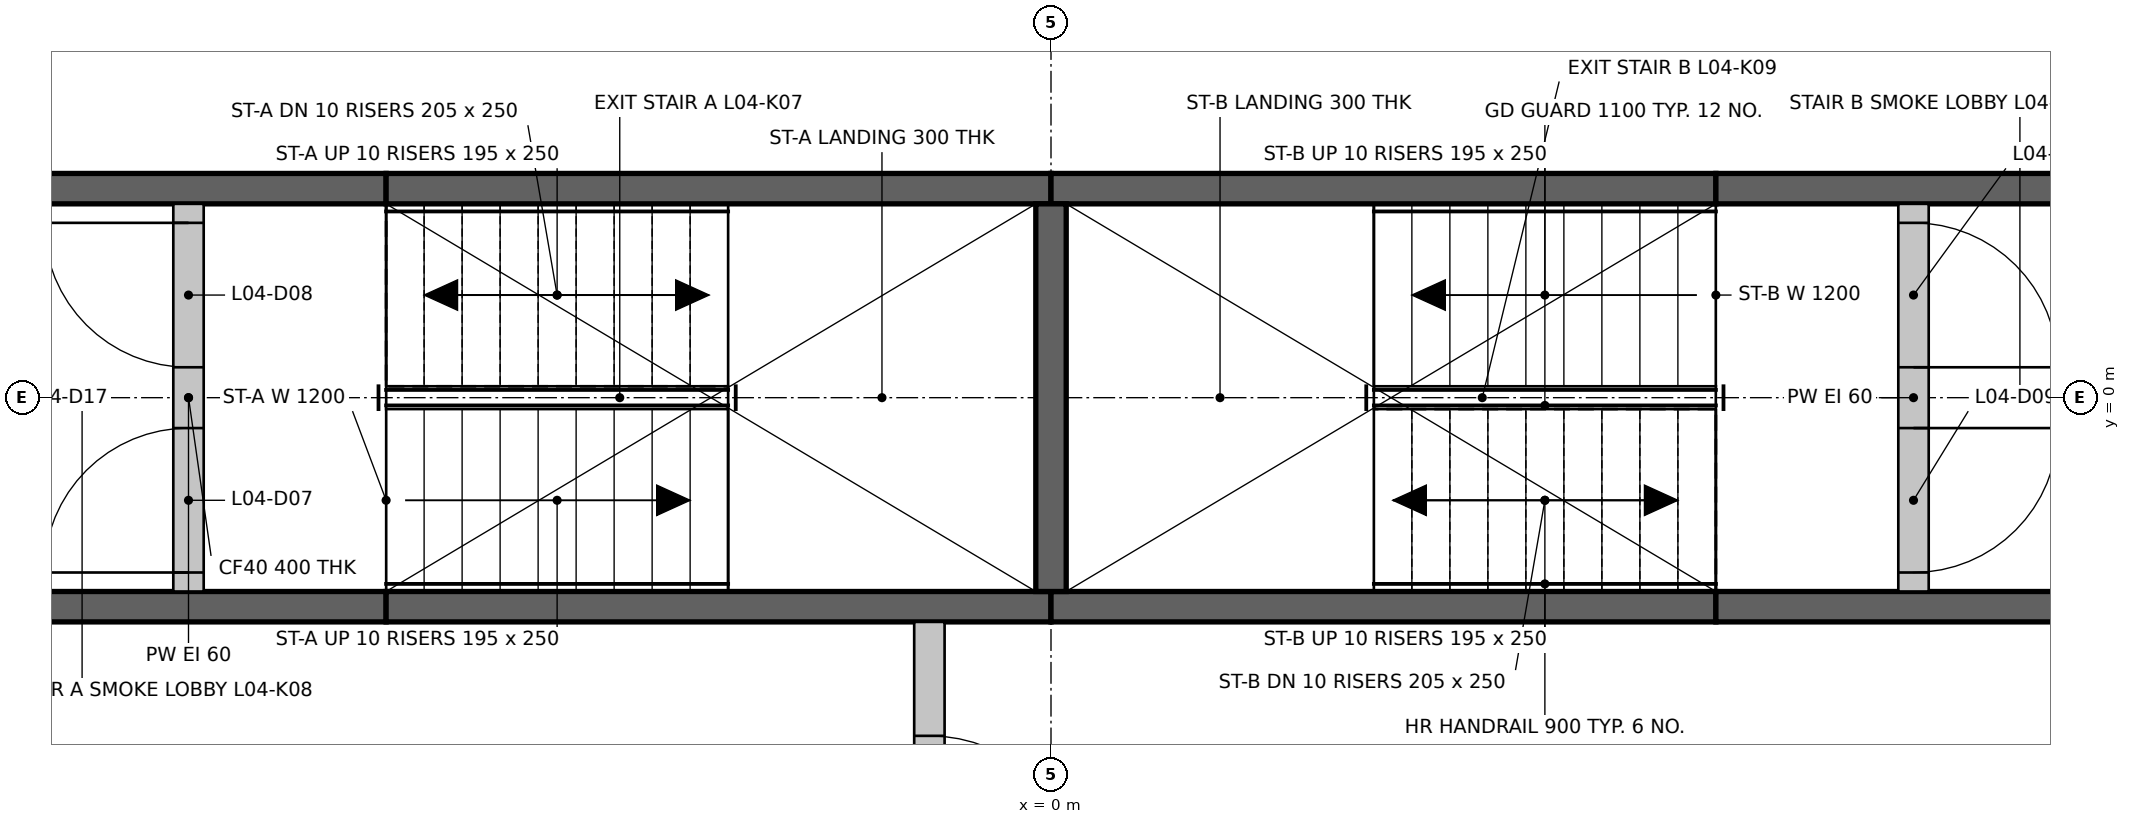
"""IFC4 building model, lengths in metres.
Left out: names, types, materials, properties, quantities, classifications, styles, units other than length and angle.
Written with IfcOpenShell. Run it as: python <this file> out.ifc"""

import sys

from ifc_helpers import new_model, si_unit, direction, frame, frame_2d, origin, place, context, subcontext, project, spatial, rectangle, extrude, element, fill, save


model = new_model("IFC4")
c1 = context("Model", 3, precision=1e-05, world=origin(), true_north=direction((0.0, 1.0)))
c2 = subcontext(c1, "Body", "Model", "MODEL_VIEW")
j1 = project(units=[si_unit("LENGTHUNIT", "METRE"), si_unit("PLANEANGLEUNIT", "RADIAN")], contexts=[c1])
p1 = place(None, origin())
s1 = spatial("IfcSite", under=j1, at=p1, CompositionType="ELEMENT")
p2 = place(p1, origin())
s2 = spatial("IfcBuilding", under=s1, at=p2, CompositionType="ELEMENT")
p3 = place(p2, frame((0.0, 0.0, 18.5)))
s3 = spatial("IfcBuildingStorey", under=s2, at=p3, CompositionType="ELEMENT", Elevation=18.5)
p4 = place(p3, frame((-6.974, -1.375, 0.0), z_axis=(0.0, 0.0, 1.0), x_axis=(1.0, 0.0, 0.0)))
e1 = element("IfcWall", 1, at=p4, inside=s3, PredefinedType="SHEAR", context=c2, shape_type="SweptSolid", body=[
    extrude(rectangle(XDim=2.6, YDim=0.2, at=frame_2d((1.3, 0.0))), origin(), (0.0, 0.0, 1.0), 3.55),
])
for number, where, z_axis, x_axis in (
    (2, (-4.374, -1.375, 0.0), (0.0, 0.0, 1.0), (1.0, 0.0, 0.0)),
    (3, (0.0, -1.375, 0.0), (0.0, 0.0, 1.0), (1.0, 0.0, 0.0)),
):
    element("IfcWall", number, at=place(p3, frame(where, z_axis=z_axis, x_axis=x_axis)), inside=s3, PredefinedType="SHEAR", context=c2, shape_type="SweptSolid", body=[
        extrude(rectangle(XDim=4.374, YDim=0.2, at=frame_2d((2.187, 0.0))), origin(), (0.0, 0.0, 1.0), 3.55),
    ])
for number, where, z_axis, x_axis in (
    (4, (4.374, -1.375, 0.0), (0.0, 0.0, 1.0), (1.0, 0.0, 0.0)),
    (5, (-6.974, 1.375, 0.0), (0.0, 0.0, 1.0), (1.0, 0.0, 0.0)),
):
    element("IfcWall", number, at=place(p3, frame(where, z_axis=z_axis, x_axis=x_axis)), inside=s3, PredefinedType="SHEAR", context=c2, shape_type="SweptSolid", body=[
        extrude(rectangle(XDim=2.6, YDim=0.2, at=frame_2d((1.3, 0.0))), origin(), (0.0, 0.0, 1.0), 3.55),
    ])
for number, where, z_axis, x_axis in (
    (6, (-4.374, 1.375, 0.0), (0.0, 0.0, 1.0), (1.0, 0.0, 0.0)),
    (7, (0.0, 1.375, 0.0), (0.0, 0.0, 1.0), (1.0, 0.0, 0.0)),
):
    element("IfcWall", number, at=place(p3, frame(where, z_axis=z_axis, x_axis=x_axis)), inside=s3, PredefinedType="SHEAR", context=c2, shape_type="SweptSolid", body=[
        extrude(rectangle(XDim=4.374, YDim=0.2, at=frame_2d((2.187, 0.0))), origin(), (0.0, 0.0, 1.0), 3.55),
    ])
p5 = place(p3, frame((4.374, 1.375, 0.0), z_axis=(0.0, 0.0, 1.0), x_axis=(1.0, 0.0, 0.0)))
e8 = element("IfcWall", 8, at=p5, inside=s3, PredefinedType="SHEAR", context=c2, shape_type="SweptSolid", body=[
    extrude(rectangle(XDim=2.6, YDim=0.2, at=frame_2d((1.3, 0.0))), origin(), (0.0, 0.0, 1.0), 3.55),
])
p6 = place(p3, frame((0.0, -1.275, 0.0), z_axis=(0.0, 0.0, 1.0), x_axis=(0.0, 1.0, 0.0)))
e9 = element("IfcWall", 9, at=p6, inside=s3, PredefinedType="SHEAR", context=c2, shape_type="SweptSolid", body=[
    extrude(rectangle(XDim=2.55, YDim=0.2, at=frame_2d((1.275, 0.0))), origin(), (0.0, 0.0, 1.0), 3.55),
])
p7 = place(p3, frame((-0.8, -3.974, 0.0), z_axis=(0.0, 0.0, 1.0), x_axis=(0.0, 1.0, 0.0)))
e10 = element("IfcWall", 10, at=p7, inside=s3, PredefinedType="PARTITIONING", context=c2, shape_type="SweptSolid", body=[
    extrude(rectangle(XDim=2.499, YDim=0.2, at=frame_2d((1.25, 0.0))), origin(), (0.0, 0.0, 1.0), 3.55),
])
p8 = place(p7, frame((0.75, 0.0, 0.0)))
e11 = element("IfcOpeningElement", 11, at=p8, cuts=e10, PredefinedType="OPENING", context=c2, shape_type="SweptSolid", body=[
    extrude(rectangle(XDim=1.0, YDim=2.1, at=frame_2d((0.5, 1.05))), frame((0.0, 0.11, 0.0), z_axis=(0.0, -1.0, 0.0), x_axis=(1.0, 0.0, 0.0)), (0.0, 0.0, 1.0), 0.22),
])
p9 = place(p3, frame((-5.674, -1.275, 0.0), z_axis=(0.0, 0.0, 1.0), x_axis=(0.0, 1.0, 0.0)))
e12 = element("IfcWall", 12, at=p9, inside=s3, PredefinedType="PARTITIONING", context=c2, shape_type="SweptSolid", body=[
    extrude(rectangle(XDim=2.55, YDim=0.2, at=frame_2d((1.275, 0.0))), origin(), (0.0, 0.0, 1.0), 3.55),
])
p10 = place(p9, frame((0.125, 0.0, 0.0)))
e13 = element("IfcOpeningElement", 13, at=p10, cuts=e12, PredefinedType="OPENING", context=c2, shape_type="SweptSolid", body=[
    extrude(rectangle(XDim=0.95, YDim=2.1, at=frame_2d((0.475, 1.05))), frame((0.0, 0.11, 0.0), z_axis=(0.0, -1.0, 0.0), x_axis=(1.0, 0.0, 0.0)), (0.0, 0.0, 1.0), 0.22),
])
p11 = place(p9, frame((1.475, 0.0, 0.0)))
e14 = element("IfcOpeningElement", 14, at=p11, cuts=e12, PredefinedType="OPENING", context=c2, shape_type="SweptSolid", body=[
    extrude(rectangle(XDim=0.95, YDim=2.1, at=frame_2d((0.475, 1.05))), frame((0.0, 0.11, 0.0), z_axis=(0.0, -1.0, 0.0), x_axis=(1.0, 0.0, 0.0)), (0.0, 0.0, 1.0), 0.22),
])
p12 = place(p3, frame((5.674, -1.275, 0.0), z_axis=(0.0, 0.0, 1.0), x_axis=(0.0, 1.0, 0.0)))
e15 = element("IfcWall", 15, at=p12, inside=s3, PredefinedType="PARTITIONING", context=c2, shape_type="SweptSolid", body=[
    extrude(rectangle(XDim=2.55, YDim=0.2, at=frame_2d((1.275, 0.0))), origin(), (0.0, 0.0, 1.0), 3.55),
])
p13 = place(p12, frame((0.125, 0.0, 0.0)))
e16 = element("IfcOpeningElement", 16, at=p13, cuts=e15, PredefinedType="OPENING", context=c2, shape_type="SweptSolid", body=[
    extrude(rectangle(XDim=0.95, YDim=2.1, at=frame_2d((0.475, 1.05))), frame((0.0, 0.11, 0.0), z_axis=(0.0, -1.0, 0.0), x_axis=(1.0, 0.0, 0.0)), (0.0, 0.0, 1.0), 0.22),
])
p14 = place(p12, frame((1.475, 0.0, 0.0)))
e17 = element("IfcOpeningElement", 17, at=p14, cuts=e15, PredefinedType="OPENING", context=c2, shape_type="SweptSolid", body=[
    extrude(rectangle(XDim=0.95, YDim=2.1, at=frame_2d((0.475, 1.05))), frame((0.0, 0.11, 0.0), z_axis=(0.0, -1.0, 0.0), x_axis=(1.0, 0.0, 0.0)), (0.0, 0.0, 1.0), 0.22),
])
p15 = place(p10, origin())
e18 = element("IfcDoor", 18, at=p15, inside=s3, OperationType="SINGLE_SWING_LEFT", PredefinedType="DOOR", context=c2, shape_type="SweptSolid", body=[
    extrude(rectangle(XDim=0.95, YDim=2.1, at=frame_2d((0.475, 1.05))), frame((0.0, 0.025, 0.0), z_axis=(0.0, -1.0, 0.0), x_axis=(1.0, 0.0, 0.0)), (0.0, 0.0, 1.0), 0.05),
])
fill(e13, e18)
p16 = place(p11, origin())
e19 = element("IfcDoor", 19, at=p16, inside=s3, OperationType="SINGLE_SWING_RIGHT", PredefinedType="DOOR", context=c2, shape_type="SweptSolid", body=[
    extrude(rectangle(XDim=0.95, YDim=2.1, at=frame_2d((0.475, 1.05))), frame((0.0, 0.025, 0.0), z_axis=(0.0, -1.0, 0.0), x_axis=(1.0, 0.0, 0.0)), (0.0, 0.0, 1.0), 0.05),
])
fill(e14, e19)
p17 = place(p13, frame((0.95, 0.0, 0.0), z_axis=(0.0, 0.0, 1.0), x_axis=(-1.0, 0.0, 0.0)))
e20 = element("IfcDoor", 20, at=p17, inside=s3, OperationType="SINGLE_SWING_RIGHT", PredefinedType="DOOR", context=c2, shape_type="SweptSolid", body=[
    extrude(rectangle(XDim=0.95, YDim=2.1, at=frame_2d((0.475, 1.05))), frame((0.0, 0.025, 0.0), z_axis=(0.0, -1.0, 0.0), x_axis=(1.0, 0.0, 0.0)), (0.0, 0.0, 1.0), 0.05),
])
fill(e16, e20)
p18 = place(p14, frame((0.95, 0.0, 0.0), z_axis=(0.0, 0.0, 1.0), x_axis=(-1.0, 0.0, 0.0)))
e21 = element("IfcDoor", 21, at=p18, inside=s3, OperationType="SINGLE_SWING_LEFT", PredefinedType="DOOR", context=c2, shape_type="SweptSolid", body=[
    extrude(rectangle(XDim=0.95, YDim=2.1, at=frame_2d((0.475, 1.05))), frame((0.0, 0.025, 0.0), z_axis=(0.0, -1.0, 0.0), x_axis=(1.0, 0.0, 0.0)), (0.0, 0.0, 1.0), 0.05),
])
fill(e17, e21)
p19 = place(p8, frame((1.0, 0.0, 0.0), z_axis=(0.0, 0.0, 1.0), x_axis=(-1.0, 0.0, 0.0)))
e22 = element("IfcDoor", 22, at=p19, inside=s3, OperationType="SINGLE_SWING_LEFT", PredefinedType="DOOR", context=c2, shape_type="SweptSolid", body=[
    extrude(rectangle(XDim=1.0, YDim=2.1, at=frame_2d((0.5, 1.05))), frame((0.0, 0.025, 0.0), z_axis=(0.0, -1.0, 0.0), x_axis=(1.0, 0.0, 0.0)), (0.0, 0.0, 1.0), 0.05),
])
fill(e11, e22)
save(model, sys.argv[1])
